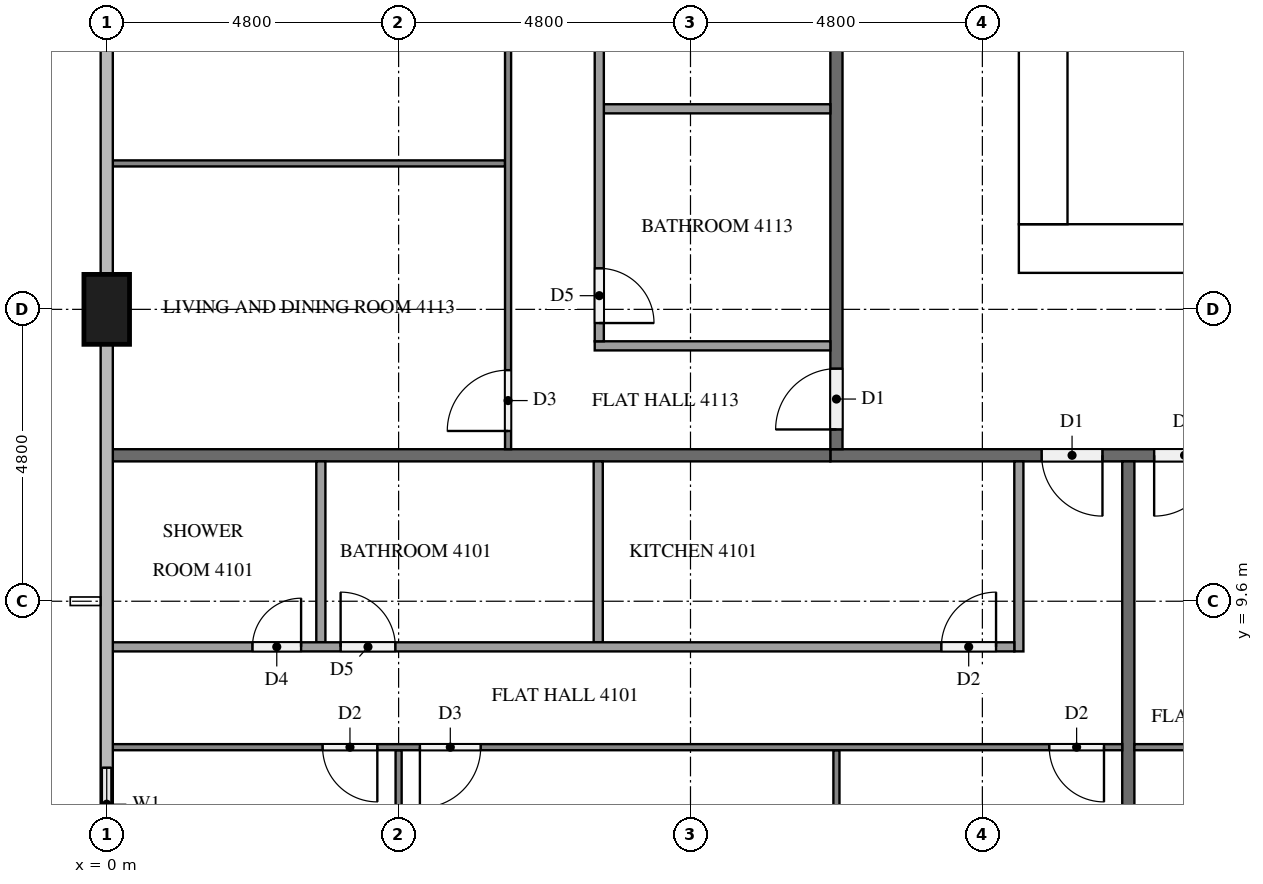
"""IFC4 building model, lengths in metres.
Left out: names, types, materials, properties, quantities, classifications, styles, units other than length and angle.
Written with IfcOpenShell. Run it as: python <this file> out.ifc"""

import sys

from ifc_helpers import new_model, si_unit, direction, frame, frame_2d, origin, origin_2d, place, context, subcontext, project, spatial, rectangle, extrude, element, fill, save


model = new_model("IFC4")
c1 = context("Model", 3, precision=1e-05, world=origin(), true_north=direction((0.0, 1.0)))
c2 = subcontext(c1, "Body", "Model", "MODEL_VIEW")
j1 = project(units=[si_unit("LENGTHUNIT", "METRE"), si_unit("PLANEANGLEUNIT", "RADIAN")], contexts=[c1])
p1 = place(None, origin())
s1 = spatial("IfcSite", under=j1, at=p1, CompositionType="ELEMENT")
p2 = place(p1, origin())
s2 = spatial("IfcBuilding", under=s1, at=p2, CompositionType="ELEMENT")
p3 = place(p2, frame((0.0, 0.0, 159.5)))
s3 = spatial("IfcBuildingStorey", under=s2, at=p3, CompositionType="ELEMENT", Elevation=159.5)
p4 = place(p3, frame((15.0, 15.4, 0.0), z_axis=(0.0, 0.0, 1.0), x_axis=(1.0, 0.0, 0.0)))
e1 = element("IfcWall", 1, at=p4, inside=s3, PredefinedType="SHEAR", context=c2, shape_type="SweptSolid", body=[
    extrude(rectangle(XDim=32.4, YDim=0.8, at=frame_2d((16.2, 0.0))), origin(), (0.0, 0.0, 1.0), 3.2),
])
p5 = place(p4, frame((15.3, 0.0, 0.0)))
e2 = element("IfcOpeningElement", 2, at=p5, cuts=e1, PredefinedType="OPENING", context=c2, shape_type="SweptSolid", body=[
    extrude(rectangle(XDim=1.8, YDim=2.1, at=frame_2d((0.9, 1.05))), frame((0.0, 0.41, 0.0), z_axis=(0.0, -1.0, 0.0), x_axis=(1.0, 0.0, 0.0)), (0.0, 0.0, 1.0), 0.82),
])
p6 = place(p3, frame((15.4, 15.8, 0.0), z_axis=(0.0, 0.0, 1.0), x_axis=(0.0, 1.0, 0.0)))
e3 = element("IfcWall", 3, at=p6, inside=s3, PredefinedType="SHEAR", context=c2, shape_type="SweptSolid", body=[
    extrude(rectangle(XDim=21.2, YDim=0.8, at=frame_2d((10.6, 0.0))), origin(), (0.0, 0.0, 1.0), 3.2),
])
p7 = place(p6, frame((4.96, 0.0, 0.0)))
e4 = element("IfcOpeningElement", 4, at=p7, cuts=e3, PredefinedType="OPENING", context=c2, shape_type="SweptSolid", body=[
    extrude(rectangle(XDim=1.2, YDim=2.1, at=frame_2d((0.6, 1.05))), frame((0.0, 0.41, 0.0), z_axis=(0.0, -1.0, 0.0), x_axis=(1.0, 0.0, 0.0)), (0.0, 0.0, 1.0), 0.82),
])
p8 = place(p3, frame((0.0, 14.4, 0.0), z_axis=(0.0, 0.0, 1.0), x_axis=(0.0, 1.0, 0.0)))
e5 = element("IfcColumn", 5, at=p8, inside=s3, PredefinedType="COLUMN", context=c2, shape_type="SweptSolid", body=[
    extrude(rectangle(XDim=1.15, YDim=0.75, at=origin_2d()), origin(), (0.0, 0.0, 1.0), 3.2),
])
p9 = place(p3, frame((0.0, 7.2, 0.0), z_axis=(0.0, 0.0, 1.0), x_axis=(0.0, -1.0, 0.0)))
e6 = element("IfcWall", 6, at=p9, inside=s3, PredefinedType="SOLIDWALL", context=c2, shape_type="SweptSolid", body=[
    extrude(rectangle(XDim=1.875, YDim=0.15, at=frame_2d((0.938, 0.0))), origin(), (0.0, 0.0, 1.0), 3.2),
])
p10 = place(p9, frame((0.337, 0.0, 0.9)))
e7 = element("IfcOpeningElement", 7, at=p10, cuts=e6, PredefinedType="OPENING", context=c2, shape_type="SweptSolid", body=[
    extrude(rectangle(XDim=1.2, YDim=1.4, at=frame_2d((0.6, 0.7))), frame((0.0, 0.085, 0.0), z_axis=(0.0, -1.0, 0.0), x_axis=(1.0, 0.0, 0.0)), (0.0, 0.0, 1.0), 0.17),
])
p11 = place(p3, frame((50.5, 12.0, 0.0), z_axis=(0.0, 0.0, 1.0), x_axis=(-1.0, 0.0, 0.0)))
e8 = element("IfcWall", 8, at=p11, inside=s3, PredefinedType="PARTITIONING", context=c2, shape_type="SweptSolid", body=[
    extrude(rectangle(XDim=38.6, YDim=0.2, at=frame_2d((19.3, 0.0))), origin(), (0.0, 0.0, 1.0), 3.2),
])
p12 = place(p11, frame((34.125, 0.0, 0.0)))
e9 = element("IfcOpeningElement", 9, at=p12, cuts=e8, PredefinedType="OPENING", context=c2, shape_type="SweptSolid", body=[
    extrude(rectangle(XDim=1.0, YDim=2.1, at=frame_2d((0.5, 1.05))), frame((0.0, 0.11, 0.0), z_axis=(0.0, -1.0, 0.0), x_axis=(1.0, 0.0, 0.0)), (0.0, 0.0, 1.0), 0.22),
])
p13 = place(p11, frame((32.275, 0.0, 0.0)))
e10 = element("IfcOpeningElement", 10, at=p13, cuts=e8, PredefinedType="OPENING", context=c2, shape_type="SweptSolid", body=[
    extrude(rectangle(XDim=1.0, YDim=2.1, at=frame_2d((0.5, 1.05))), frame((0.0, 0.11, 0.0), z_axis=(0.0, -1.0, 0.0), x_axis=(1.0, 0.0, 0.0)), (0.0, 0.0, 1.0), 0.22),
])
p14 = place(p11, frame((12.525, 0.0, 0.0)))
e11 = element("IfcOpeningElement", 11, at=p14, cuts=e8, PredefinedType="OPENING", context=c2, shape_type="SweptSolid", body=[
    extrude(rectangle(XDim=1.0, YDim=2.1, at=frame_2d((0.5, 1.05))), frame((0.0, 0.11, 0.0), z_axis=(0.0, -1.0, 0.0), x_axis=(1.0, 0.0, 0.0)), (0.0, 0.0, 1.0), 0.22),
])
p15 = place(p11, frame((10.625, 0.0, 0.0)))
e12 = element("IfcOpeningElement", 12, at=p15, cuts=e8, PredefinedType="OPENING", context=c2, shape_type="SweptSolid", body=[
    extrude(rectangle(XDim=1.1, YDim=2.1, at=frame_2d((0.55, 1.05))), frame((0.0, 0.11, 0.0), z_axis=(0.0, -1.0, 0.0), x_axis=(1.0, 0.0, 0.0)), (0.0, 0.0, 1.0), 0.22),
])
p16 = place(p3, frame((12.0, 12.1, 0.0), z_axis=(0.0, 0.0, 1.0), x_axis=(0.0, 1.0, 0.0)))
e13 = element("IfcWall", 13, at=p16, inside=s3, PredefinedType="PARTITIONING", context=c2, shape_type="SweptSolid", body=[
    extrude(rectangle(XDim=28.6, YDim=0.2, at=frame_2d((14.3, 0.0))), origin(), (0.0, 0.0, 1.0), 3.2),
])
p17 = place(p16, frame((24.325, 0.0, 0.0)))
e14 = element("IfcOpeningElement", 14, at=p17, cuts=e13, PredefinedType="OPENING", context=c2, shape_type="SweptSolid", body=[
    extrude(rectangle(XDim=1.0, YDim=2.1, at=frame_2d((0.5, 1.05))), frame((0.0, 0.11, 0.0), z_axis=(0.0, -1.0, 0.0), x_axis=(1.0, 0.0, 0.0)), (0.0, 0.0, 1.0), 0.22),
])
p18 = place(p16, frame((22.475, 0.0, 0.0)))
e15 = element("IfcOpeningElement", 15, at=p18, cuts=e13, PredefinedType="OPENING", context=c2, shape_type="SweptSolid", body=[
    extrude(rectangle(XDim=1.0, YDim=2.1, at=frame_2d((0.5, 1.05))), frame((0.0, 0.11, 0.0), z_axis=(0.0, -1.0, 0.0), x_axis=(1.0, 0.0, 0.0)), (0.0, 0.0, 1.0), 0.22),
])
p19 = place(p16, frame((0.325, 0.0, 0.0)))
e16 = element("IfcOpeningElement", 16, at=p19, cuts=e13, PredefinedType="OPENING", context=c2, shape_type="SweptSolid", body=[
    extrude(rectangle(XDim=1.0, YDim=2.1, at=frame_2d((0.5, 1.05))), frame((0.0, 0.11, 0.0), z_axis=(0.0, -1.0, 0.0), x_axis=(1.0, 0.0, 0.0)), (0.0, 0.0, 1.0), 0.22),
])
for number, where, z_axis, x_axis in (
    (17, (16.8, 11.9, 0.0), (0.0, 0.0, 1.0), (0.0, -1.0, 0.0)),
    (18, (0.1, 12.0, 0.0), (0.0, 0.0, 1.0), (1.0, 0.0, 0.0)),
):
    element("IfcWall", number, at=place(p3, frame(where, z_axis=z_axis, x_axis=x_axis)), inside=s3, PredefinedType="PARTITIONING", context=c2, shape_type="SweptSolid", body=[
        extrude(rectangle(XDim=11.8, YDim=0.2, at=frame_2d((5.9, 0.0))), origin(), (0.0, 0.0, 1.0), 3.2),
    ])
p20 = place(p3, frame((12.0, 7.15, 0.0), z_axis=(0.0, 0.0, 1.0), x_axis=(0.0, -1.0, 0.0)))
e19 = element("IfcWall", 19, at=p20, inside=s3, PredefinedType="PARTITIONING", context=c2, shape_type="SweptSolid", body=[
    extrude(rectangle(XDim=7.05, YDim=0.1, at=frame_2d((3.525, 0.0))), origin(), (0.0, 0.0, 1.0), 3.2),
])
p21 = place(p3, frame((4.8, 7.15, 0.0), z_axis=(0.0, 0.0, 1.0), x_axis=(0.0, -1.0, 0.0)))
e20 = element("IfcWall", 20, at=p21, inside=s3, PredefinedType="PARTITIONING", context=c2, shape_type="SweptSolid", body=[
    extrude(rectangle(XDim=6.625, YDim=0.1, at=frame_2d((3.312, 0.0))), origin(), (0.0, 0.0, 1.0), 3.2),
])
p22 = place(p3, frame((16.7, 7.2, 0.0), z_axis=(0.0, 0.0, 1.0), x_axis=(-1.0, 0.0, 0.0)))
e21 = element("IfcWall", 21, at=p22, inside=s3, PredefinedType="PARTITIONING", context=c2, shape_type="SweptSolid", body=[
    extrude(rectangle(XDim=16.6, YDim=0.1, at=frame_2d((8.3, 0.0))), origin(), (0.0, 0.0, 1.0), 3.2),
])
p23 = place(p22, frame((0.3, 0.0, 0.0)))
e22 = element("IfcOpeningElement", 22, at=p23, cuts=e21, PredefinedType="OPENING", context=c2, shape_type="SweptSolid", body=[
    extrude(rectangle(XDim=0.9, YDim=2.1, at=frame_2d((0.45, 1.05))), frame((0.0, 0.06, 0.0), z_axis=(0.0, -1.0, 0.0), x_axis=(1.0, 0.0, 0.0)), (0.0, 0.0, 1.0), 0.12),
])
p24 = place(p22, frame((10.55, 0.0, 0.0)))
e23 = element("IfcOpeningElement", 23, at=p24, cuts=e21, PredefinedType="OPENING", context=c2, shape_type="SweptSolid", body=[
    extrude(rectangle(XDim=1.0, YDim=2.1, at=frame_2d((0.5, 1.05))), frame((0.0, 0.06, 0.0), z_axis=(0.0, -1.0, 0.0), x_axis=(1.0, 0.0, 0.0)), (0.0, 0.0, 1.0), 0.12),
])
p25 = place(p22, frame((12.25, 0.0, 0.0)))
e24 = element("IfcOpeningElement", 24, at=p25, cuts=e21, PredefinedType="OPENING", context=c2, shape_type="SweptSolid", body=[
    extrude(rectangle(XDim=0.9, YDim=2.1, at=frame_2d((0.45, 1.05))), frame((0.0, 0.06, 0.0), z_axis=(0.0, -1.0, 0.0), x_axis=(1.0, 0.0, 0.0)), (0.0, 0.0, 1.0), 0.12),
])
for number, where, z_axis, x_axis in (
    (25, (8.083, 11.9, 0.0), (0.0, 0.0, 1.0), (0.0, -1.0, 0.0)),
    (26, (3.521, 11.9, 0.0), (0.0, 0.0, 1.0), (0.0, -1.0, 0.0)),
):
    element("IfcWall", number, at=place(p3, frame(where, z_axis=z_axis, x_axis=x_axis)), inside=s3, PredefinedType="PARTITIONING", context=c2, shape_type="SweptSolid", body=[
        extrude(rectangle(XDim=2.975, YDim=0.15, at=frame_2d((1.487, 0.0))), origin(), (0.0, 0.0, 1.0), 3.2),
    ])
p26 = place(p3, frame((15.0, 11.9, 0.0), z_axis=(0.0, 0.0, 1.0), x_axis=(0.0, -1.0, 0.0)))
e27 = element("IfcWall", 27, at=p26, inside=s3, PredefinedType="PARTITIONING", context=c2, shape_type="SweptSolid", body=[
    extrude(rectangle(XDim=3.125, YDim=0.15, at=frame_2d((1.562, 0.0))), origin(), (0.0, 0.0, 1.0), 3.2),
])
p27 = place(p3, frame((0.1, 8.85, 0.0), z_axis=(0.0, 0.0, 1.0), x_axis=(1.0, 0.0, 0.0)))
e28 = element("IfcWall", 28, at=p27, inside=s3, PredefinedType="PARTITIONING", context=c2, shape_type="SweptSolid", body=[
    extrude(rectangle(XDim=14.825, YDim=0.15, at=frame_2d((7.413, 0.0))), origin(), (0.0, 0.0, 1.0), 3.2),
])
p28 = place(p27, frame((13.625, 0.0, 0.0)))
e29 = element("IfcOpeningElement", 29, at=p28, cuts=e28, PredefinedType="OPENING", context=c2, shape_type="SweptSolid", body=[
    extrude(rectangle(XDim=0.9, YDim=2.1, at=frame_2d((0.45, 1.05))), frame((0.0, 0.085, 0.0), z_axis=(0.0, -1.0, 0.0), x_axis=(1.0, 0.0, 0.0)), (0.0, 0.0, 1.0), 0.17),
])
p29 = place(p27, frame((3.746, 0.0, 0.0)))
e30 = element("IfcOpeningElement", 30, at=p29, cuts=e28, PredefinedType="OPENING", context=c2, shape_type="SweptSolid", body=[
    extrude(rectangle(XDim=0.9, YDim=2.1, at=frame_2d((0.45, 1.05))), frame((0.0, 0.085, 0.0), z_axis=(0.0, -1.0, 0.0), x_axis=(1.0, 0.0, 0.0)), (0.0, 0.0, 1.0), 0.17),
])
p30 = place(p27, frame((2.296, 0.0, 0.0)))
e31 = element("IfcOpeningElement", 31, at=p30, cuts=e28, PredefinedType="OPENING", context=c2, shape_type="SweptSolid", body=[
    extrude(rectangle(XDim=0.8, YDim=2.1, at=frame_2d((0.4, 1.05))), frame((0.0, 0.085, 0.0), z_axis=(0.0, -1.0, 0.0), x_axis=(1.0, 0.0, 0.0)), (0.0, 0.0, 1.0), 0.17),
])
p31 = place(p3, frame((23.9, 7.2, 0.0), z_axis=(0.0, 0.0, 1.0), x_axis=(-1.0, 0.0, 0.0)))
e32 = element("IfcWall", 32, at=p31, inside=s3, PredefinedType="PARTITIONING", context=c2, shape_type="SweptSolid", body=[
    extrude(rectangle(XDim=7.0, YDim=0.1, at=frame_2d((3.5, 0.0))), origin(), (0.0, 0.0, 1.0), 3.2),
])
p32 = place(p31, frame((0.3, 0.0, 0.0)))
e33 = element("IfcOpeningElement", 33, at=p32, cuts=e32, PredefinedType="OPENING", context=c2, shape_type="SweptSolid", body=[
    extrude(rectangle(XDim=1.0, YDim=2.1, at=frame_2d((0.5, 1.05))), frame((0.0, 0.06, 0.0), z_axis=(0.0, -1.0, 0.0), x_axis=(1.0, 0.0, 0.0)), (0.0, 0.0, 1.0), 0.12),
])
p33 = place(p3, frame((6.55, 16.8, 0.0), z_axis=(0.0, 0.0, 1.0), x_axis=(-1.0, 0.0, 0.0)))
e34 = element("IfcWall", 34, at=p33, inside=s3, PredefinedType="PARTITIONING", context=c2, shape_type="SweptSolid", body=[
    extrude(rectangle(XDim=6.45, YDim=0.1, at=frame_2d((3.225, 0.0))), origin(), (0.0, 0.0, 1.0), 3.2),
])
p34 = place(p3, frame((6.6, 12.1, 0.0), z_axis=(0.0, 0.0, 1.0), x_axis=(0.0, 1.0, 0.0)))
e35 = element("IfcWall", 35, at=p34, inside=s3, PredefinedType="PARTITIONING", context=c2, shape_type="SweptSolid", body=[
    extrude(rectangle(XDim=14.2, YDim=0.1, at=frame_2d((7.1, 0.0))), origin(), (0.0, 0.0, 1.0), 3.2),
])
p35 = place(p34, frame((0.3, 0.0, 0.0)))
e36 = element("IfcOpeningElement", 36, at=p35, cuts=e35, PredefinedType="OPENING", context=c2, shape_type="SweptSolid", body=[
    extrude(rectangle(XDim=1.0, YDim=2.1, at=frame_2d((0.5, 1.05))), frame((0.0, 0.06, 0.0), z_axis=(0.0, -1.0, 0.0), x_axis=(1.0, 0.0, 0.0)), (0.0, 0.0, 1.0), 0.12),
])
p36 = place(p34, frame((8.25, 0.0, 0.0)))
e37 = element("IfcOpeningElement", 37, at=p36, cuts=e35, PredefinedType="OPENING", context=c2, shape_type="SweptSolid", body=[
    extrude(rectangle(XDim=0.9, YDim=2.1, at=frame_2d((0.45, 1.05))), frame((0.0, 0.06, 0.0), z_axis=(0.0, -1.0, 0.0), x_axis=(1.0, 0.0, 0.0)), (0.0, 0.0, 1.0), 0.12),
])
p37 = place(p34, frame((9.85, 0.0, 0.0)))
e38 = element("IfcOpeningElement", 38, at=p37, cuts=e35, PredefinedType="OPENING", context=c2, shape_type="SweptSolid", body=[
    extrude(rectangle(XDim=0.9, YDim=2.1, at=frame_2d((0.45, 1.05))), frame((0.0, 0.06, 0.0), z_axis=(0.0, -1.0, 0.0), x_axis=(1.0, 0.0, 0.0)), (0.0, 0.0, 1.0), 0.12),
])
p38 = place(p3, frame((11.9, 17.698, 0.0), z_axis=(0.0, 0.0, 1.0), x_axis=(-1.0, 0.0, 0.0)))
e39 = element("IfcWall", 39, at=p38, inside=s3, PredefinedType="PARTITIONING", context=c2, shape_type="SweptSolid", body=[
    extrude(rectangle(XDim=3.725, YDim=0.15, at=frame_2d((1.862, 0.0))), origin(), (0.0, 0.0, 1.0), 3.2),
])
p39 = place(p3, frame((11.9, 13.8, 0.0), z_axis=(0.0, 0.0, 1.0), x_axis=(-1.0, 0.0, 0.0)))
e40 = element("IfcWall", 40, at=p39, inside=s3, PredefinedType="PARTITIONING", context=c2, shape_type="SweptSolid", body=[
    extrude(rectangle(XDim=3.875, YDim=0.15, at=frame_2d((1.938, 0.0))), origin(), (0.0, 0.0, 1.0), 3.2),
])
p40 = place(p3, frame((8.1, 26.3, 0.0), z_axis=(0.0, 0.0, 1.0), x_axis=(0.0, -1.0, 0.0)))
e41 = element("IfcWall", 41, at=p40, inside=s3, PredefinedType="PARTITIONING", context=c2, shape_type="SweptSolid", body=[
    extrude(rectangle(XDim=12.425, YDim=0.15, at=frame_2d((6.212, 0.0))), origin(), (0.0, 0.0, 1.0), 3.2),
])
p41 = place(p40, frame((11.225, 0.0, 0.0)))
e42 = element("IfcOpeningElement", 42, at=p41, cuts=e41, PredefinedType="OPENING", context=c2, shape_type="SweptSolid", body=[
    extrude(rectangle(XDim=0.9, YDim=2.1, at=frame_2d((0.45, 1.05))), frame((0.0, 0.085, 0.0), z_axis=(0.0, -1.0, 0.0), x_axis=(1.0, 0.0, 0.0)), (0.0, 0.0, 1.0), 0.17),
])
p42 = place(p40, frame((6.06, 0.0, 0.0)))
e43 = element("IfcOpeningElement", 43, at=p42, cuts=e41, PredefinedType="OPENING", context=c2, shape_type="SweptSolid", body=[
    extrude(rectangle(XDim=0.8, YDim=2.1, at=frame_2d((0.4, 1.05))), frame((0.0, 0.085, 0.0), z_axis=(0.0, -1.0, 0.0), x_axis=(1.0, 0.0, 0.0)), (0.0, 0.0, 1.0), 0.17),
])
p43 = place(p40, frame((4.51, 0.0, 0.0)))
e44 = element("IfcOpeningElement", 44, at=p43, cuts=e41, PredefinedType="OPENING", context=c2, shape_type="SweptSolid", body=[
    extrude(rectangle(XDim=0.9, YDim=2.1, at=frame_2d((0.45, 1.05))), frame((0.0, 0.085, 0.0), z_axis=(0.0, -1.0, 0.0), x_axis=(1.0, 0.0, 0.0)), (0.0, 0.0, 1.0), 0.17),
])
p44 = place(p10, origin())
e45 = element("IfcWindow", 45, at=p44, inside=s3, PartitioningType="SINGLE_PANEL", PredefinedType="WINDOW", context=c2, shape_type="SweptSolid", body=[
    extrude(rectangle(XDim=1.2, YDim=1.4, at=frame_2d((0.6, 0.7))), frame((0.0, 0.03, 0.0), z_axis=(0.0, -1.0, 0.0), x_axis=(1.0, 0.0, 0.0)), (0.0, 0.0, 1.0), 0.06),
])
fill(e7, e45)
p45 = place(p12, origin())
e46 = element("IfcDoor", 46, at=p45, inside=s3, OperationType="SINGLE_SWING_LEFT", PredefinedType="DOOR", context=c2, shape_type="SweptSolid", body=[
    extrude(rectangle(XDim=1.0, YDim=2.1, at=frame_2d((0.5, 1.05))), frame((0.0, 0.025, 0.0), z_axis=(0.0, -1.0, 0.0), x_axis=(1.0, 0.0, 0.0)), (0.0, 0.0, 1.0), 0.05),
])
fill(e9, e46)
p46 = place(p13, origin())
e47 = element("IfcDoor", 47, at=p46, inside=s3, OperationType="SINGLE_SWING_RIGHT", PredefinedType="DOOR", context=c2, shape_type="SweptSolid", body=[
    extrude(rectangle(XDim=1.0, YDim=2.1, at=frame_2d((0.5, 1.05))), frame((0.0, 0.025, 0.0), z_axis=(0.0, -1.0, 0.0), x_axis=(1.0, 0.0, 0.0)), (0.0, 0.0, 1.0), 0.05),
])
fill(e10, e47)
p47 = place(p19, origin())
e48 = element("IfcDoor", 48, at=p47, inside=s3, OperationType="SINGLE_SWING_LEFT", PredefinedType="DOOR", context=c2, shape_type="SweptSolid", body=[
    extrude(rectangle(XDim=1.0, YDim=2.1, at=frame_2d((0.5, 1.05))), frame((0.0, 0.025, 0.0), z_axis=(0.0, -1.0, 0.0), x_axis=(1.0, 0.0, 0.0)), (0.0, 0.0, 1.0), 0.05),
])
fill(e16, e48)
p48 = place(p23, origin())
e49 = element("IfcDoor", 49, at=p48, inside=s3, OperationType="SINGLE_SWING_LEFT", PredefinedType="DOOR", context=c2, shape_type="SweptSolid", body=[
    extrude(rectangle(XDim=0.9, YDim=2.1, at=frame_2d((0.45, 1.05))), frame((0.0, 0.025, 0.0), z_axis=(0.0, -1.0, 0.0), x_axis=(1.0, 0.0, 0.0)), (0.0, 0.0, 1.0), 0.05),
])
fill(e22, e49)
p49 = place(p24, origin())
e50 = element("IfcDoor", 50, at=p49, inside=s3, OperationType="SINGLE_SWING_RIGHT", PredefinedType="DOOR", context=c2, shape_type="SweptSolid", body=[
    extrude(rectangle(XDim=1.0, YDim=2.1, at=frame_2d((0.5, 1.05))), frame((0.0, 0.025, 0.0), z_axis=(0.0, -1.0, 0.0), x_axis=(1.0, 0.0, 0.0)), (0.0, 0.0, 1.0), 0.05),
])
fill(e23, e50)
p50 = place(p25, origin())
e51 = element("IfcDoor", 51, at=p50, inside=s3, OperationType="SINGLE_SWING_LEFT", PredefinedType="DOOR", context=c2, shape_type="SweptSolid", body=[
    extrude(rectangle(XDim=0.9, YDim=2.1, at=frame_2d((0.45, 1.05))), frame((0.0, 0.025, 0.0), z_axis=(0.0, -1.0, 0.0), x_axis=(1.0, 0.0, 0.0)), (0.0, 0.0, 1.0), 0.05),
])
fill(e24, e51)
p51 = place(p28, origin())
e52 = element("IfcDoor", 52, at=p51, inside=s3, OperationType="SINGLE_SWING_RIGHT", PredefinedType="DOOR", context=c2, shape_type="SweptSolid", body=[
    extrude(rectangle(XDim=0.9, YDim=2.1, at=frame_2d((0.45, 1.05))), frame((0.0, 0.025, 0.0), z_axis=(0.0, -1.0, 0.0), x_axis=(1.0, 0.0, 0.0)), (0.0, 0.0, 1.0), 0.05),
])
fill(e29, e52)
p52 = place(p29, origin())
e53 = element("IfcDoor", 53, at=p52, inside=s3, OperationType="SINGLE_SWING_LEFT", PredefinedType="DOOR", context=c2, shape_type="SweptSolid", body=[
    extrude(rectangle(XDim=0.9, YDim=2.1, at=frame_2d((0.45, 1.05))), frame((0.0, 0.025, 0.0), z_axis=(0.0, -1.0, 0.0), x_axis=(1.0, 0.0, 0.0)), (0.0, 0.0, 1.0), 0.05),
])
fill(e30, e53)
p53 = place(p30, origin())
e54 = element("IfcDoor", 54, at=p53, inside=s3, OperationType="SINGLE_SWING_RIGHT", PredefinedType="DOOR", context=c2, shape_type="SweptSolid", body=[
    extrude(rectangle(XDim=0.8, YDim=2.1, at=frame_2d((0.4, 1.05))), frame((0.0, 0.025, 0.0), z_axis=(0.0, -1.0, 0.0), x_axis=(1.0, 0.0, 0.0)), (0.0, 0.0, 1.0), 0.05),
])
fill(e31, e54)
p54 = place(p35, origin())
e55 = element("IfcDoor", 55, at=p54, inside=s3, OperationType="SINGLE_SWING_LEFT", PredefinedType="DOOR", context=c2, shape_type="SweptSolid", body=[
    extrude(rectangle(XDim=1.0, YDim=2.1, at=frame_2d((0.5, 1.05))), frame((0.0, 0.025, 0.0), z_axis=(0.0, -1.0, 0.0), x_axis=(1.0, 0.0, 0.0)), (0.0, 0.0, 1.0), 0.05),
])
fill(e36, e55)
p55 = place(p41, origin())
e56 = element("IfcDoor", 56, at=p55, inside=s3, OperationType="SINGLE_SWING_RIGHT", PredefinedType="DOOR", context=c2, shape_type="SweptSolid", body=[
    extrude(rectangle(XDim=0.9, YDim=2.1, at=frame_2d((0.45, 1.05))), frame((0.0, 0.025, 0.0), z_axis=(0.0, -1.0, 0.0), x_axis=(1.0, 0.0, 0.0)), (0.0, 0.0, 1.0), 0.05),
])
fill(e42, e56)
save(model, sys.argv[1])
